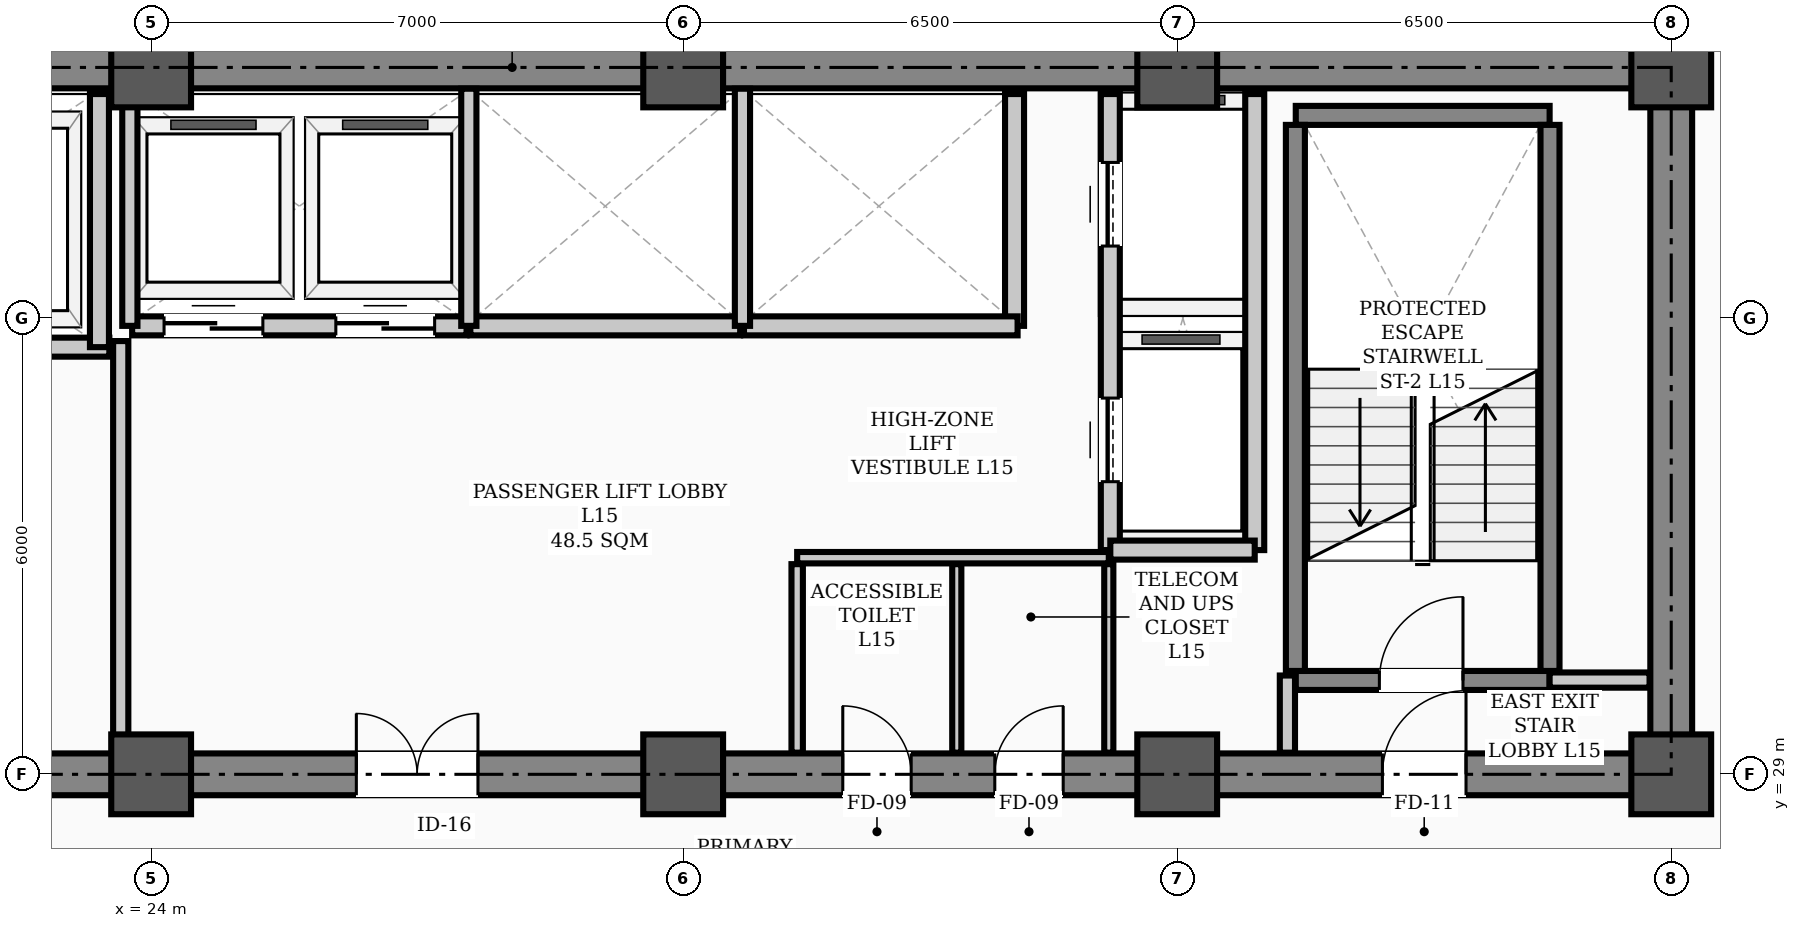
"""IFC4 building model, lengths in metres.
Left out: names, types, materials, properties, quantities, classifications, styles, units other than length and angle.
Written with IfcOpenShell. Run it as: python <this file> out.ifc"""

import sys

from ifc_helpers import new_model, si_unit, direction, frame, frame_2d, origin, origin_2d, place, context, subcontext, project, spatial, rectangle, hollow_rectangle, extrude, element, fill, save


model = new_model("IFC4")
c1 = context("Model", 3, precision=1e-05, world=origin(), true_north=direction((0.0, 1.0)))
c2 = subcontext(c1, "Body", "Model", "MODEL_VIEW")
j1 = project(units=[si_unit("LENGTHUNIT", "METRE"), si_unit("PLANEANGLEUNIT", "RADIAN")], contexts=[c1])
p1 = place(None, origin())
s1 = spatial("IfcSite", under=j1, at=p1, CompositionType="ELEMENT")
p2 = place(p1, origin())
s2 = spatial("IfcBuilding", under=s1, at=p2, CompositionType="ELEMENT")
p3 = place(p2, frame((0.0, 0.0, 61.6)))
s3 = spatial("IfcBuildingStorey", under=s2, at=p3, CompositionType="ELEMENT", Elevation=61.6)
for number, where, z_axis, x_axis in (
    (1, (24.0, 29.0, 0.0), (0.0, 0.0, 1.0), (1.0, 0.0, 0.0)),
    (2, (24.0, 38.3, 0.0), (0.0, 0.0, 1.0), (1.0, 0.0, 0.0)),
    (3, (31.0, 29.0, 0.0), (0.0, 0.0, 1.0), (1.0, 0.0, 0.0)),
    (4, (31.0, 38.3, 0.0), (0.0, 0.0, 1.0), (1.0, 0.0, 0.0)),
    (5, (37.5, 29.0, 0.0), (0.0, 0.0, 1.0), (1.0, 0.0, 0.0)),
    (6, (37.5, 38.3, 0.0), (0.0, 0.0, 1.0), (1.0, 0.0, 0.0)),
    (7, (44.0, 29.0, 0.0), (0.0, 0.0, 1.0), (1.0, 0.0, 0.0)),
    (8, (44.0, 38.3, 0.0), (0.0, 0.0, 1.0), (1.0, 0.0, 0.0)),
):
    element("IfcColumn", number, at=place(p3, frame(where, z_axis=z_axis, x_axis=x_axis)), inside=s3, PredefinedType="COLUMN", context=c2, shape_type="SweptSolid", body=[
        extrude(hollow_rectangle(XDim=1.05, YDim=1.05, WallThickness=0.038, InnerFilletRadius=0.019, OuterFilletRadius=0.057, at=origin_2d()), origin(), (0.0, 0.0, 1.0), 3.9),
    ])
p4 = place(p3, frame((13.5, 29.0, 0.0), z_axis=(0.0, 0.0, 1.0), x_axis=(1.0, 0.0, 0.0)))
e9 = element("IfcWall", 9, at=p4, inside=s3, PredefinedType="SHEAR", context=c2, shape_type="SweptSolid", body=[
    extrude(rectangle(XDim=30.5, YDim=0.55, at=frame_2d((15.25, 0.0))), origin(), (0.0, 0.0, 1.0), 3.72),
])
p5 = place(p4, frame((1.75, 0.0, 0.0)))
e10 = element("IfcOpeningElement", 10, at=p5, cuts=e9, PredefinedType="OPENING", context=c2, shape_type="SweptSolid", body=[
    extrude(rectangle(XDim=1.1, YDim=2.08, at=frame_2d((0.55, 1.04))), frame((0.0, 0.285, 0.0), z_axis=(0.0, -1.0, 0.0), x_axis=(1.0, 0.0, 0.0)), (0.0, 0.0, 1.0), 0.57),
])
p6 = place(p4, frame((26.7, 0.0, 0.0)))
e11 = element("IfcOpeningElement", 11, at=p6, cuts=e9, PredefinedType="OPENING", context=c2, shape_type="SweptSolid", body=[
    extrude(rectangle(XDim=1.1, YDim=2.08, at=frame_2d((0.55, 1.04))), frame((0.0, 0.285, 0.0), z_axis=(0.0, -1.0, 0.0), x_axis=(1.0, 0.0, 0.0)), (0.0, 0.0, 1.0), 0.57),
])
p7 = place(p4, frame((6.8, 0.0, 0.0)))
e12 = element("IfcOpeningElement", 12, at=p7, cuts=e9, PredefinedType="OPENING", context=c2, shape_type="SweptSolid", body=[
    extrude(rectangle(XDim=1.1, YDim=2.08, at=frame_2d((0.55, 1.04))), frame((0.0, 0.285, 0.0), z_axis=(0.0, -1.0, 0.0), x_axis=(1.0, 0.0, 0.0)), (0.0, 0.0, 1.0), 0.57),
])
p8 = place(p4, frame((13.2, 0.0, 0.0)))
e13 = element("IfcOpeningElement", 13, at=p8, cuts=e9, PredefinedType="OPENING", context=c2, shape_type="SweptSolid", body=[
    extrude(rectangle(XDim=1.6, YDim=2.08, at=frame_2d((0.8, 1.04))), frame((0.0, 0.285, 0.0), z_axis=(0.0, -1.0, 0.0), x_axis=(1.0, 0.0, 0.0)), (0.0, 0.0, 1.0), 0.57),
])
p9 = place(p4, frame((19.6, 0.0, 0.0)))
e14 = element("IfcOpeningElement", 14, at=p9, cuts=e9, PredefinedType="OPENING", context=c2, shape_type="SweptSolid", body=[
    extrude(rectangle(XDim=0.9, YDim=2.08, at=frame_2d((0.45, 1.04))), frame((0.0, 0.285, 0.0), z_axis=(0.0, -1.0, 0.0), x_axis=(1.0, 0.0, 0.0)), (0.0, 0.0, 1.0), 0.57),
])
p10 = place(p4, frame((21.6, 0.0, 0.0)))
e15 = element("IfcOpeningElement", 15, at=p10, cuts=e9, PredefinedType="OPENING", context=c2, shape_type="SweptSolid", body=[
    extrude(rectangle(XDim=0.9, YDim=2.08, at=frame_2d((0.45, 1.04))), frame((0.0, 0.285, 0.0), z_axis=(0.0, -1.0, 0.0), x_axis=(1.0, 0.0, 0.0)), (0.0, 0.0, 1.0), 0.57),
])
p11 = place(p3, frame((13.5, 38.3, 0.0), z_axis=(0.0, 0.0, 1.0), x_axis=(1.0, 0.0, 0.0)))
e16 = element("IfcWall", 16, at=p11, inside=s3, PredefinedType="SHEAR", context=c2, shape_type="SweptSolid", body=[
    extrude(rectangle(XDim=30.5, YDim=0.55, at=frame_2d((15.25, 0.0))), origin(), (0.0, 0.0, 1.0), 3.72),
])
p12 = place(p3, frame((44.0, 29.35, 0.0), z_axis=(0.0, 0.0, 1.0), x_axis=(0.0, 1.0, 0.0)))
e17 = element("IfcWall", 17, at=p12, inside=s3, PredefinedType="SHEAR", context=c2, shape_type="SweptSolid", body=[
    extrude(rectangle(XDim=8.6, YDim=0.55, at=frame_2d((4.3, 0.0))), origin(), (0.0, 0.0, 1.0), 3.72),
])
p13 = place(p3, frame((39.06, 30.235, 0.0), z_axis=(0.0, 0.0, 1.0), x_axis=(1.0, 0.0, 0.0)))
e18 = element("IfcWall", 18, at=p13, inside=s3, PredefinedType="STANDARD", context=c2, shape_type="SweptSolid", body=[
    extrude(rectangle(XDim=3.34, YDim=0.25, at=frame_2d((1.67, 0.0))), origin(), (0.0, 0.0, 1.0), 3.72),
])
p14 = place(p13, frame((1.1, 0.0, 0.0)))
e19 = element("IfcOpeningElement", 19, at=p14, cuts=e18, PredefinedType="OPENING", context=c2, shape_type="SweptSolid", body=[
    extrude(rectangle(XDim=1.1, YDim=2.08, at=frame_2d((0.55, 1.04))), frame((0.0, 0.135, 0.0), z_axis=(0.0, -1.0, 0.0), x_axis=(1.0, 0.0, 0.0)), (0.0, 0.0, 1.0), 0.27),
])
p15 = place(p3, frame((39.06, 37.669, 0.0), z_axis=(0.0, 0.0, 1.0), x_axis=(1.0, 0.0, 0.0)))
e20 = element("IfcWall", 20, at=p15, inside=s3, PredefinedType="STANDARD", context=c2, shape_type="SweptSolid", body=[
    extrude(rectangle(XDim=3.34, YDim=0.25, at=frame_2d((1.67, 0.0))), origin(), (0.0, 0.0, 1.0), 3.72),
])
for number, where, z_axis, x_axis in (
    (21, (39.055, 30.36, 0.0), (0.0, 0.0, 1.0), (0.0, 1.0, 0.0)),
    (22, (42.405, 30.36, 0.0), (0.0, 0.0, 1.0), (0.0, 1.0, 0.0)),
):
    element("IfcWall", number, at=place(p3, frame(where, z_axis=z_axis, x_axis=x_axis)), inside=s3, PredefinedType="STANDARD", context=c2, shape_type="SweptSolid", body=[
        extrude(rectangle(XDim=7.184, YDim=0.25, at=frame_2d((3.592, 0.0))), origin(), (0.0, 0.0, 1.0), 3.72),
    ])
p16 = place(p3, frame((18.1, 34.62, 0.0), z_axis=(0.0, 0.0, 1.0), x_axis=(1.0, 0.0, 0.0)))
e23 = element("IfcWall", 23, at=p16, inside=s3, PredefinedType="STANDARD", context=c2, shape_type="SweptSolid", body=[
    extrude(rectangle(XDim=5.35, YDim=0.25, at=frame_2d((2.675, 0.0))), origin(), (0.0, 0.0, 1.0), 3.72),
])
p17 = place(p16, frame((0.85, 0.0, 0.0)))
e24 = element("IfcOpeningElement", 24, at=p17, cuts=e23, PredefinedType="OPENING", context=c2, shape_type="SweptSolid", body=[
    extrude(rectangle(XDim=1.1, YDim=2.08, at=frame_2d((0.55, 1.04))), frame((0.0, 0.135, 0.0), z_axis=(0.0, -1.0, 0.0), x_axis=(1.0, 0.0, 0.0)), (0.0, 0.0, 1.0), 0.27),
])
p18 = place(p16, frame((3.45, 0.0, 0.0)))
e25 = element("IfcOpeningElement", 25, at=p18, cuts=e23, PredefinedType="OPENING", context=c2, shape_type="SweptSolid", body=[
    extrude(rectangle(XDim=1.1, YDim=2.08, at=frame_2d((0.55, 1.04))), frame((0.0, 0.135, 0.0), z_axis=(0.0, -1.0, 0.0), x_axis=(1.0, 0.0, 0.0)), (0.0, 0.0, 1.0), 0.27),
])
p19 = place(p3, frame((36.62, 31.95, 0.0), z_axis=(0.0, 0.0, 1.0), x_axis=(0.0, 1.0, 0.0)))
e26 = element("IfcWall", 26, at=p19, inside=s3, PredefinedType="STANDARD", context=c2, shape_type="SweptSolid", body=[
    extrude(rectangle(XDim=6.0, YDim=0.25, at=frame_2d((3.0, 0.0))), origin(), (0.0, 0.0, 1.0), 3.3),
])
p20 = place(p19, frame((0.9, 0.0, 0.0)))
e27 = element("IfcOpeningElement", 27, at=p20, cuts=e26, PredefinedType="OPENING", context=c2, shape_type="SweptSolid", body=[
    extrude(rectangle(XDim=1.1, YDim=2.08, at=frame_2d((0.55, 1.04))), frame((0.0, 0.135, 0.0), z_axis=(0.0, -1.0, 0.0), x_axis=(1.0, 0.0, 0.0)), (0.0, 0.0, 1.0), 0.27),
])
p21 = place(p19, frame((4.0, 0.0, 0.0)))
e28 = element("IfcOpeningElement", 28, at=p21, cuts=e26, PredefinedType="OPENING", context=c2, shape_type="SweptSolid", body=[
    extrude(rectangle(XDim=1.1, YDim=2.08, at=frame_2d((0.55, 1.04))), frame((0.0, 0.135, 0.0), z_axis=(0.0, -1.0, 0.0), x_axis=(1.0, 0.0, 0.0)), (0.0, 0.0, 1.0), 0.27),
])
p22 = place(p3, frame((38.52, 31.95, 0.0), z_axis=(0.0, 0.0, 1.0), x_axis=(0.0, 1.0, 0.0)))
e29 = element("IfcWall", 29, at=p22, inside=s3, PredefinedType="STANDARD", context=c2, shape_type="SweptSolid", body=[
    extrude(rectangle(XDim=6.0, YDim=0.25, at=frame_2d((3.0, 0.0))), origin(), (0.0, 0.0, 1.0), 3.3),
])
p23 = place(p3, frame((36.62, 31.95, 0.0), z_axis=(0.0, 0.0, 1.0), x_axis=(1.0, 0.0, 0.0)))
e30 = element("IfcWall", 30, at=p23, inside=s3, PredefinedType="STANDARD", context=c2, shape_type="SweptSolid", body=[
    extrude(rectangle(XDim=1.9, YDim=0.25, at=frame_2d((0.95, 0.0))), origin(), (0.0, 0.0, 1.0), 3.48),
])
p24 = place(p3, frame((23.32, 34.62, 0.0), z_axis=(0.0, 0.0, 1.0), x_axis=(0.0, 1.0, 0.0)))
e31 = element("IfcWall", 31, at=p24, inside=s3, PredefinedType="STANDARD", context=c2, shape_type="SweptSolid", body=[
    extrude(rectangle(XDim=3.33, YDim=0.25, at=frame_2d((1.665, 0.0))), origin(), (0.0, 0.0, 1.0), 3.3),
])
p25 = place(p3, frame((35.36, 34.9, 0.0), z_axis=(0.0, 0.0, 1.0), x_axis=(0.0, 1.0, 0.0)))
e32 = element("IfcWall", 32, at=p25, inside=s3, PredefinedType="STANDARD", context=c2, shape_type="SweptSolid", body=[
    extrude(rectangle(XDim=3.05, YDim=0.25, at=frame_2d((1.525, 0.0))), origin(), (0.0, 0.0, 1.0), 3.3),
])
p26 = place(p3, frame((23.75, 34.9, 0.0), z_axis=(0.0, 0.0, 1.0), x_axis=(1.0, 0.0, 0.0)))
e33 = element("IfcWall", 33, at=p26, inside=s3, PredefinedType="STANDARD", context=c2, shape_type="SweptSolid", body=[
    extrude(rectangle(XDim=4.4, YDim=0.25, at=frame_2d((2.2, 0.0))), origin(), (0.0, 0.0, 1.0), 3.72),
])
p27 = place(p26, frame((0.42, 0.0, 0.0)))
e34 = element("IfcOpeningElement", 34, at=p27, cuts=e33, PredefinedType="OPENING", context=c2, shape_type="SweptSolid", body=[
    extrude(rectangle(XDim=1.3, YDim=2.08, at=frame_2d((0.65, 1.04))), frame((0.0, 0.135, 0.0), z_axis=(0.0, -1.0, 0.0), x_axis=(1.0, 0.0, 0.0)), (0.0, 0.0, 1.0), 0.27),
])
p28 = place(p26, frame((2.68, 0.0, 0.0)))
e35 = element("IfcOpeningElement", 35, at=p28, cuts=e33, PredefinedType="OPENING", context=c2, shape_type="SweptSolid", body=[
    extrude(rectangle(XDim=1.3, YDim=2.08, at=frame_2d((0.65, 1.04))), frame((0.0, 0.135, 0.0), z_axis=(0.0, -1.0, 0.0), x_axis=(1.0, 0.0, 0.0)), (0.0, 0.0, 1.0), 0.27),
])
p29 = place(p3, frame((28.2, 34.9, 0.0), z_axis=(0.0, 0.0, 1.0), x_axis=(1.0, 0.0, 0.0)))
e36 = element("IfcWall", 36, at=p29, inside=s3, PredefinedType="STANDARD", context=c2, shape_type="SweptSolid", body=[
    extrude(rectangle(XDim=3.55, YDim=0.25, at=frame_2d((1.775, 0.0))), origin(), (0.0, 0.0, 1.0), 3.72),
])
p30 = place(p3, frame((31.8, 34.9, 0.0), z_axis=(0.0, 0.0, 1.0), x_axis=(1.0, 0.0, 0.0)))
e37 = element("IfcWall", 37, at=p30, inside=s3, PredefinedType="STANDARD", context=c2, shape_type="SweptSolid", body=[
    extrude(rectangle(XDim=3.6, YDim=0.25, at=frame_2d((1.8, 0.0))), origin(), (0.0, 0.0, 1.0), 3.72),
])
p31 = place(p3, frame((42.4, 30.24, 0.0), z_axis=(0.0, 0.0, 1.0), x_axis=(1.0, 0.0, 0.0)))
e38 = element("IfcWall", 38, at=p31, inside=s3, PredefinedType="STANDARD", context=c2, shape_type="SweptSolid", body=[
    extrude(rectangle(XDim=1.315, YDim=0.2, at=frame_2d((0.658, 0.0))), origin(), (0.0, 0.0, 1.0), 3.1),
])
p32 = place(p3, frame((32.5, 31.85, 0.0), z_axis=(0.0, 0.0, 1.0), x_axis=(1.0, 0.0, 0.0)))
e39 = element("IfcWall", 39, at=p32, inside=s3, PredefinedType="PARTITIONING", context=c2, shape_type="SweptSolid", body=[
    extrude(rectangle(XDim=4.1, YDim=0.15, at=frame_2d((2.05, 0.0))), origin(), (0.0, 0.0, 1.0), 3.72),
])
p33 = place(p3, frame((38.95, 29.285, 0.0), z_axis=(0.0, 0.0, 1.0), x_axis=(0.0, 1.0, 0.0)))
e40 = element("IfcWall", 40, at=p33, inside=s3, PredefinedType="STANDARD", context=c2, shape_type="SweptSolid", body=[
    extrude(rectangle(XDim=1.015, YDim=0.2, at=frame_2d((0.508, 0.0))), origin(), (0.0, 0.0, 1.0), 3.3),
])
p34 = place(p3, frame((23.6, 29.285, 0.0), z_axis=(0.0, 0.0, 1.0), x_axis=(0.0, 1.0, 0.0)))
e41 = element("IfcWall", 41, at=p34, inside=s3, PredefinedType="STANDARD", context=c2, shape_type="SweptSolid", body=[
    extrude(rectangle(XDim=5.415, YDim=0.2, at=frame_2d((2.708, 0.0))), origin(), (0.0, 0.0, 1.0), 3.1),
])
p35 = place(p3, frame((32.5, 29.285, 0.0), z_axis=(0.0, 0.0, 1.0), x_axis=(0.0, 1.0, 0.0)))
e42 = element("IfcWall", 42, at=p35, inside=s3, PredefinedType="PARTITIONING", context=c2, shape_type="SweptSolid", body=[
    extrude(rectangle(XDim=2.48, YDim=0.15, at=frame_2d((1.24, 0.0))), origin(), (0.0, 0.0, 1.0), 3.3),
])
for number, where, z_axis, x_axis in (
    (43, (36.6, 29.285, 0.0), (0.0, 0.0, 1.0), (0.0, 1.0, 0.0)),
    (44, (34.6, 29.285, 0.0), (0.0, 0.0, 1.0), (0.0, 1.0, 0.0)),
):
    element("IfcWall", number, at=place(p3, frame(where, z_axis=z_axis, x_axis=x_axis)), inside=s3, PredefinedType="PARTITIONING", context=c2, shape_type="SweptSolid", body=[
        extrude(rectangle(XDim=2.48, YDim=0.12, at=frame_2d((1.24, 0.0))), origin(), (0.0, 0.0, 1.0), 3.3),
    ])
p36 = place(p3, frame((23.72, 34.9, 0.0), z_axis=(0.0, 0.0, 1.0), x_axis=(0.0, 1.0, 0.0)))
e45 = element("IfcWall", 45, at=p36, inside=s3, PredefinedType="STANDARD", context=c2, shape_type="SweptSolid", body=[
    extrude(rectangle(XDim=3.12, YDim=0.2, at=frame_2d((1.56, 0.0))), origin(), (0.0, 0.0, 1.0), 3.1),
])
for number, where, z_axis, x_axis in (
    (46, (28.18, 34.9, 0.0), (0.0, 0.0, 1.0), (0.0, 1.0, 0.0)),
    (47, (31.78, 34.9, 0.0), (0.0, 0.0, 1.0), (0.0, 1.0, 0.0)),
):
    element("IfcWall", number, at=place(p3, frame(where, z_axis=z_axis, x_axis=x_axis)), inside=s3, PredefinedType="STANDARD", context=c2, shape_type="SweptSolid", body=[
        extrude(rectangle(XDim=3.12, YDim=0.2, at=frame_2d((1.56, 0.0))), origin(), (0.0, 0.0, 1.0), 3.3),
    ])
p37 = place(p14, origin())
e48 = element("IfcDoor", 48, at=p37, inside=s3, OperationType="SINGLE_SWING_RIGHT", PredefinedType="DOOR", context=c2, shape_type="SweptSolid", body=[
    extrude(rectangle(XDim=1.1, YDim=2.08, at=frame_2d((0.55, 1.04))), frame((0.0, 0.025, 0.0), z_axis=(0.0, -1.0, 0.0), x_axis=(1.0, 0.0, 0.0)), (0.0, 0.0, 1.0), 0.05),
])
fill(e19, e48)
p38 = place(p6, origin())
e49 = element("IfcDoor", 49, at=p38, inside=s3, OperationType="SINGLE_SWING_RIGHT", PredefinedType="DOOR", context=c2, shape_type="SweptSolid", body=[
    extrude(rectangle(XDim=1.1, YDim=2.08, at=frame_2d((0.55, 1.04))), frame((0.0, 0.025, 0.0), z_axis=(0.0, -1.0, 0.0), x_axis=(1.0, 0.0, 0.0)), (0.0, 0.0, 1.0), 0.05),
])
fill(e11, e49)
p39 = place(p8, origin())
e50 = element("IfcDoor", 50, at=p39, inside=s3, OperationType="DOUBLE_DOOR_SINGLE_SWING", PredefinedType="DOOR", context=c2, shape_type="SweptSolid", body=[
    extrude(rectangle(XDim=1.6, YDim=2.08, at=frame_2d((0.8, 1.04))), frame((0.0, 0.025, 0.0), z_axis=(0.0, -1.0, 0.0), x_axis=(1.0, 0.0, 0.0)), (0.0, 0.0, 1.0), 0.05),
])
fill(e13, e50)
p40 = place(p9, origin())
e51 = element("IfcDoor", 51, at=p40, inside=s3, OperationType="SINGLE_SWING_LEFT", PredefinedType="DOOR", context=c2, shape_type="SweptSolid", body=[
    extrude(rectangle(XDim=0.9, YDim=2.08, at=frame_2d((0.45, 1.04))), frame((0.0, 0.025, 0.0), z_axis=(0.0, -1.0, 0.0), x_axis=(1.0, 0.0, 0.0)), (0.0, 0.0, 1.0), 0.05),
])
fill(e14, e51)
p41 = place(p10, origin())
e52 = element("IfcDoor", 52, at=p41, inside=s3, OperationType="SINGLE_SWING_RIGHT", PredefinedType="DOOR", context=c2, shape_type="SweptSolid", body=[
    extrude(rectangle(XDim=0.9, YDim=2.08, at=frame_2d((0.45, 1.04))), frame((0.0, 0.025, 0.0), z_axis=(0.0, -1.0, 0.0), x_axis=(1.0, 0.0, 0.0)), (0.0, 0.0, 1.0), 0.05),
])
fill(e15, e52)
p42 = place(p20, origin())
e53 = element("IfcDoor", 53, at=p42, inside=s3, OperationType="SLIDING_TO_LEFT", PredefinedType="DOOR", context=c2, shape_type="SweptSolid", body=[
    extrude(rectangle(XDim=1.1, YDim=2.08, at=frame_2d((0.55, 1.04))), frame((0.0, 0.025, 0.0), z_axis=(0.0, -1.0, 0.0), x_axis=(1.0, 0.0, 0.0)), (0.0, 0.0, 1.0), 0.05),
])
fill(e27, e53)
p43 = place(p21, origin())
e54 = element("IfcDoor", 54, at=p43, inside=s3, OperationType="SLIDING_TO_LEFT", PredefinedType="DOOR", context=c2, shape_type="SweptSolid", body=[
    extrude(rectangle(XDim=1.1, YDim=2.08, at=frame_2d((0.55, 1.04))), frame((0.0, 0.025, 0.0), z_axis=(0.0, -1.0, 0.0), x_axis=(1.0, 0.0, 0.0)), (0.0, 0.0, 1.0), 0.05),
])
fill(e28, e54)
p44 = place(p27, origin())
e55 = element("IfcDoor", 55, at=p44, inside=s3, OperationType="DOUBLE_DOOR_SLIDING", PredefinedType="DOOR", context=c2, shape_type="SweptSolid", body=[
    extrude(rectangle(XDim=1.3, YDim=2.08, at=frame_2d((0.65, 1.04))), frame((0.0, 0.025, 0.0), z_axis=(0.0, -1.0, 0.0), x_axis=(1.0, 0.0, 0.0)), (0.0, 0.0, 1.0), 0.05),
])
fill(e34, e55)
p45 = place(p28, origin())
e56 = element("IfcDoor", 56, at=p45, inside=s3, OperationType="DOUBLE_DOOR_SLIDING", PredefinedType="DOOR", context=c2, shape_type="SweptSolid", body=[
    extrude(rectangle(XDim=1.3, YDim=2.08, at=frame_2d((0.65, 1.04))), frame((0.0, 0.025, 0.0), z_axis=(0.0, -1.0, 0.0), x_axis=(1.0, 0.0, 0.0)), (0.0, 0.0, 1.0), 0.05),
])
fill(e35, e56)
save(model, sys.argv[1])
